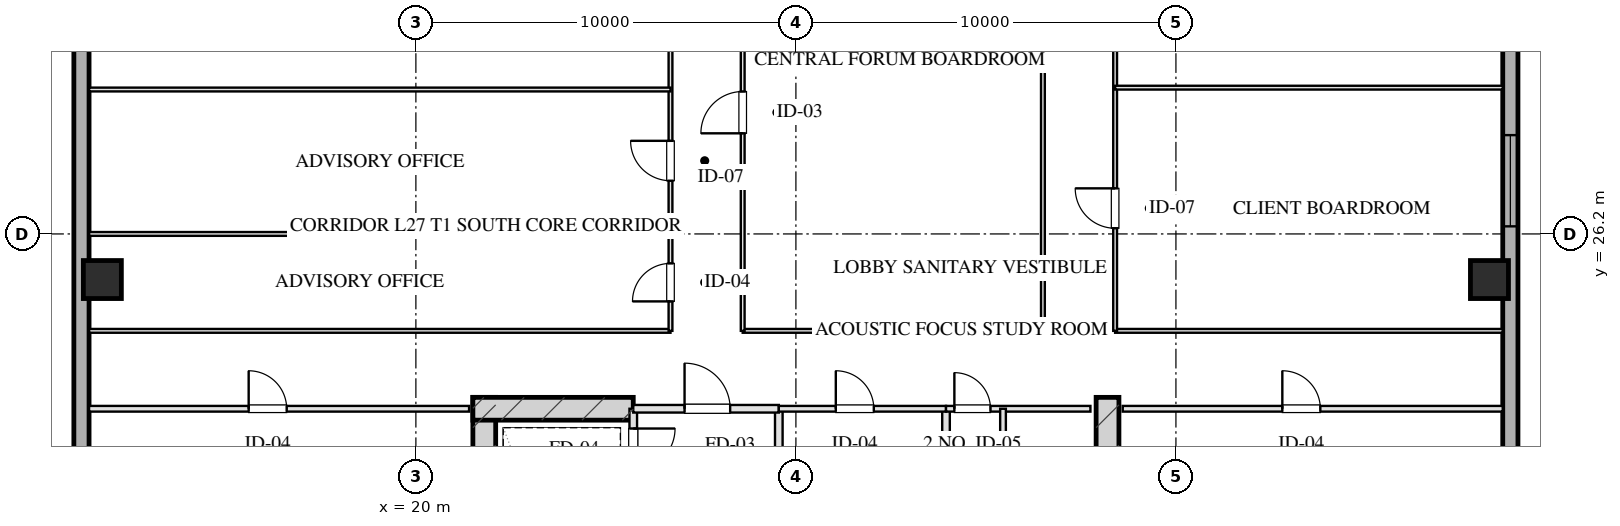
"""IFC4 building model, lengths in metres.
Left out: names, types, materials, properties, quantities, classifications, styles, units other than length and angle.
Written with IfcOpenShell. Run it as: python <this file> out.ifc"""

import sys

from ifc_helpers import new_model, si_unit, direction, frame, frame_2d, origin, origin_2d, place, context, subcontext, project, spatial, rectangle, hollow_rectangle, extrude, element, fill, save


model = new_model("IFC4")
c1 = context("Model", 3, precision=1e-05, world=origin(), true_north=direction((0.0, 1.0)))
c2 = subcontext(c1, "Body", "Model", "MODEL_VIEW")
j1 = project(units=[si_unit("LENGTHUNIT", "METRE"), si_unit("PLANEANGLEUNIT", "RADIAN")], contexts=[c1])
p1 = place(None, origin())
s1 = spatial("IfcSite", under=j1, at=p1, CompositionType="ELEMENT")
p2 = place(p1, origin())
s2 = spatial("IfcBuilding", under=s1, at=p2, CompositionType="ELEMENT")
p3 = place(p2, frame((0.0, 0.0, 106.95)))
s3 = spatial("IfcBuildingStorey", under=s2, at=p3, CompositionType="ELEMENT", Elevation=106.95)
for number, where, z_axis, x_axis in (
    (1, (21.8, 21.9, 0.0), (0.0, 0.0, 1.0), (0.0, -1.0, 0.0)),
    (2, (38.2, 21.9, 0.0), (0.0, 0.0, 1.0), (0.0, -1.0, 0.0)),
):
    element("IfcWall", number, at=place(p3, frame(where, z_axis=z_axis, x_axis=x_axis)), inside=s3, PredefinedType="SHEAR", context=c2, shape_type="SweptSolid", body=[
        extrude(rectangle(XDim=9.48, YDim=0.6, at=frame_2d((4.74, 0.0))), origin(), (0.0, 0.0, 1.0), 3.45),
    ])
p4 = place(p3, frame((21.5, 21.6, 0.0), z_axis=(0.0, 0.0, 1.0), x_axis=(1.0, 0.0, 0.0)))
e3 = element("IfcWall", 3, at=p4, inside=s3, PredefinedType="SHEAR", context=c2, shape_type="SweptSolid", body=[
    extrude(rectangle(XDim=4.22, YDim=0.6, at=frame_2d((2.11, 0.0))), origin(), (0.0, 0.0, 1.0), 3.45),
])
for number, where, z_axis, x_axis in (
    (4, (11.75, 25.0, 0.0), (0.0, 0.0, 1.0), (1.0, 0.0, 0.0)),
    (5, (48.25, 25.0, 0.0), (0.0, 0.0, 1.0), (1.0, 0.0, 0.0)),
):
    element("IfcColumn", number, at=place(p3, frame(where, z_axis=z_axis, x_axis=x_axis)), inside=s3, PredefinedType="COLUMN", context=c2, shape_type="SweptSolid", body=[
        extrude(hollow_rectangle(XDim=1.0, YDim=1.0, WallThickness=0.036, at=origin_2d()), origin(), (0.0, 0.0, 1.0), 3.451),
    ])
p5 = place(p3, frame((11.2, 9.0, 0.0), z_axis=(0.0, 0.0, 1.0), x_axis=(0.0, 1.0, 0.0)))
e6 = element("IfcWall", 6, at=p5, inside=s3, PredefinedType="SOLIDWALL", context=c2, shape_type="SweptSolid", body=[
    extrude(rectangle(XDim=50.0, YDim=0.4, at=frame_2d((25.0, 0.0))), origin(), (0.0, 0.0, 1.0), 2.61),
])
p6 = place(p5, frame((26.4, 0.0, 0.75)))
e7 = element("IfcOpeningElement", 7, at=p6, cuts=e6, PredefinedType="OPENING", context=c2, shape_type="SweptSolid", body=[
    extrude(rectangle(XDim=2.4, YDim=1.46, at=frame_2d((1.2, 0.73))), frame((0.0, 0.21, 0.0), z_axis=(0.0, -1.0, 0.0), x_axis=(1.0, 0.0, 0.0)), (0.0, 0.0, 1.0), 0.42),
])
p7 = place(p3, frame((48.8, 59.0, 0.0), z_axis=(0.0, 0.0, 1.0), x_axis=(0.0, -1.0, 0.0)))
e8 = element("IfcWall", 8, at=p7, inside=s3, PredefinedType="SOLIDWALL", context=c2, shape_type="SweptSolid", body=[
    extrude(rectangle(XDim=50.0, YDim=0.4, at=frame_2d((25.0, 0.0))), origin(), (0.0, 0.0, 1.0), 2.61),
])
p8 = place(p7, frame((30.2, 0.0, 0.75)))
e9 = element("IfcOpeningElement", 9, at=p8, cuts=e8, PredefinedType="OPENING", context=c2, shape_type="SweptSolid", body=[
    extrude(rectangle(XDim=2.4, YDim=1.46, at=frame_2d((1.2, 0.73))), frame((0.0, 0.21, 0.0), z_axis=(0.0, -1.0, 0.0), x_axis=(1.0, 0.0, 0.0)), (0.0, 0.0, 1.0), 0.42),
])
p9 = place(p7, frame((17.4, 0.0, 0.75)))
e10 = element("IfcOpeningElement", 10, at=p9, cuts=e8, PredefinedType="OPENING", context=c2, shape_type="SweptSolid", body=[
    extrude(rectangle(XDim=2.4, YDim=1.46, at=frame_2d((1.2, 0.73))), frame((0.0, 0.21, 0.0), z_axis=(0.0, -1.0, 0.0), x_axis=(1.0, 0.0, 0.0)), (0.0, 0.0, 1.0), 0.42),
])
p10 = place(p3, frame((25.72, 21.6, 0.0), z_axis=(0.0, 0.0, 1.0), x_axis=(0.0, -1.0, 0.0)))
e11 = element("IfcWall", 11, at=p10, inside=s3, PredefinedType="PARTITIONING", context=c2, shape_type="SweptSolid", body=[
    extrude(rectangle(XDim=1.9, YDim=0.2, at=frame_2d((0.95, 0.0))), origin(), (0.0, 0.0, 1.0), 3.175),
])
p11 = place(p10, frame((0.52, 0.0, 0.0)))
e12 = element("IfcOpeningElement", 12, at=p11, cuts=e11, PredefinedType="OPENING", context=c2, shape_type="SweptSolid", body=[
    extrude(rectangle(XDim=1.1, YDim=2.05, at=frame_2d((0.55, 1.025))), frame((0.0, 0.11, 0.0), z_axis=(0.0, -1.0, 0.0), x_axis=(1.0, 0.0, 0.0)), (0.0, 0.0, 1.0), 0.22),
])
p12 = place(p3, frame((29.55, 21.6, 0.0), z_axis=(0.0, 0.0, 1.0), x_axis=(0.0, -1.0, 0.0)))
e13 = element("IfcWall", 13, at=p12, inside=s3, PredefinedType="PARTITIONING", context=c2, shape_type="SweptSolid", body=[
    extrude(rectangle(XDim=8.43, YDim=0.2, at=frame_2d((4.215, 0.0))), origin(), (0.0, 0.0, 1.0), 3.175),
])
p13 = place(p3, frame((25.72, 21.6, 0.0), z_axis=(0.0, 0.0, 1.0), x_axis=(1.0, 0.0, 0.0)))
e14 = element("IfcWall", 14, at=p13, inside=s3, PredefinedType="PARTITIONING", context=c2, shape_type="SweptSolid", body=[
    extrude(rectangle(XDim=3.83, YDim=0.2, at=frame_2d((1.915, 0.0))), origin(), (0.0, 0.0, 1.0), 3.175),
])
p14 = place(p13, frame((1.35, 0.0, 0.0)))
e15 = element("IfcOpeningElement", 15, at=p14, cuts=e14, PredefinedType="OPENING", context=c2, shape_type="SweptSolid", body=[
    extrude(rectangle(XDim=1.2, YDim=2.05, at=frame_2d((0.6, 1.025))), frame((0.0, 0.11, 0.0), z_axis=(0.0, -1.0, 0.0), x_axis=(1.0, 0.0, 0.0)), (0.0, 0.0, 1.0), 0.22),
])
p15 = place(p3, frame((33.95, 21.6, 0.0), z_axis=(0.0, 0.0, 1.0), x_axis=(0.0, -1.0, 0.0)))
e16 = element("IfcWall", 16, at=p15, inside=s3, PredefinedType="PARTITIONING", context=c2, shape_type="SweptSolid", body=[
    extrude(rectangle(XDim=8.43, YDim=0.2, at=frame_2d((4.215, 0.0))), origin(), (0.0, 0.0, 1.0), 3.175),
])
p16 = place(p3, frame((29.55, 21.6, 0.0), z_axis=(0.0, 0.0, 1.0), x_axis=(1.0, 0.0, 0.0)))
e17 = element("IfcWall", 17, at=p16, inside=s3, PredefinedType="PARTITIONING", context=c2, shape_type="SweptSolid", body=[
    extrude(rectangle(XDim=4.4, YDim=0.15, at=frame_2d((2.2, 0.0))), origin(), (0.0, 0.0, 1.0), 3.175),
])
p17 = place(p16, frame((1.5, 0.0, 0.0)))
e18 = element("IfcOpeningElement", 18, at=p17, cuts=e17, PredefinedType="OPENING", context=c2, shape_type="SweptSolid", body=[
    extrude(rectangle(XDim=1.0, YDim=2.05, at=frame_2d((0.5, 1.025))), frame((0.0, 0.085, 0.0), z_axis=(0.0, -1.0, 0.0), x_axis=(1.0, 0.0, 0.0)), (0.0, 0.0, 1.0), 0.17),
])
p18 = place(p3, frame((33.95, 21.6, 0.0), z_axis=(0.0, 0.0, 1.0), x_axis=(1.0, 0.0, 0.0)))
e19 = element("IfcWall", 19, at=p18, inside=s3, PredefinedType="PARTITIONING", context=c2, shape_type="SweptSolid", body=[
    extrude(rectangle(XDim=3.8, YDim=0.15, at=frame_2d((1.9, 0.0))), origin(), (0.0, 0.0, 1.0), 3.175),
])
p19 = place(p18, frame((0.22, 0.0, 0.0)))
e20 = element("IfcOpeningElement", 20, at=p19, cuts=e19, PredefinedType="OPENING", context=c2, shape_type="SweptSolid", body=[
    extrude(rectangle(XDim=0.95, YDim=2.05, at=frame_2d((0.475, 1.025))), frame((0.0, 0.085, 0.0), z_axis=(0.0, -1.0, 0.0), x_axis=(1.0, 0.0, 0.0)), (0.0, 0.0, 1.0), 0.17),
])
p20 = place(p3, frame((35.45, 21.6, 0.0), z_axis=(0.0, 0.0, 1.0), x_axis=(0.0, -1.0, 0.0)))
e21 = element("IfcWall", 21, at=p20, inside=s3, PredefinedType="PARTITIONING", context=c2, shape_type="SweptSolid", body=[
    extrude(rectangle(XDim=8.43, YDim=0.15, at=frame_2d((4.215, 0.0))), origin(), (0.0, 0.0, 1.0), 2.815),
])
p21 = place(p20, frame((2.55, 0.0, 0.0)))
e22 = element("IfcOpeningElement", 22, at=p21, cuts=e21, PredefinedType="OPENING", context=c2, shape_type="SweptSolid", body=[
    extrude(rectangle(XDim=0.95, YDim=2.05, at=frame_2d((0.475, 1.025))), frame((0.0, 0.085, 0.0), z_axis=(0.0, -1.0, 0.0), x_axis=(1.0, 0.0, 0.0)), (0.0, 0.0, 1.0), 0.17),
])
p22 = place(p20, frame((4.7, 0.0, 0.0)))
e23 = element("IfcOpeningElement", 23, at=p22, cuts=e21, PredefinedType="OPENING", context=c2, shape_type="SweptSolid", body=[
    extrude(rectangle(XDim=0.9, YDim=2.05, at=frame_2d((0.45, 1.025))), frame((0.0, 0.085, 0.0), z_axis=(0.0, -1.0, 0.0), x_axis=(1.0, 0.0, 0.0)), (0.0, 0.0, 1.0), 0.17),
])
p23 = place(p20, frame((6.8, 0.0, 0.0)))
e24 = element("IfcOpeningElement", 24, at=p23, cuts=e21, PredefinedType="OPENING", context=c2, shape_type="SweptSolid", body=[
    extrude(rectangle(XDim=0.9, YDim=2.05, at=frame_2d((0.45, 1.025))), frame((0.0, 0.085, 0.0), z_axis=(0.0, -1.0, 0.0), x_axis=(1.0, 0.0, 0.0)), (0.0, 0.0, 1.0), 0.17),
])
p24 = place(p3, frame((11.4, 21.6, 0.0), z_axis=(0.0, 0.0, 1.0), x_axis=(1.0, 0.0, 0.0)))
e25 = element("IfcWall", 25, at=p24, inside=s3, PredefinedType="PARTITIONING", context=c2, shape_type="SweptSolid", body=[
    extrude(rectangle(XDim=10.0, YDim=0.15, at=frame_2d((5.0, 0.0))), origin(), (0.0, 0.0, 1.0), 3.175),
])
p25 = place(p24, frame((4.2, 0.0, 0.0)))
e26 = element("IfcOpeningElement", 26, at=p25, cuts=e25, PredefinedType="OPENING", context=c2, shape_type="SweptSolid", body=[
    extrude(rectangle(XDim=1.0, YDim=2.05, at=frame_2d((0.5, 1.025))), frame((0.0, 0.085, 0.0), z_axis=(0.0, -1.0, 0.0), x_axis=(1.0, 0.0, 0.0)), (0.0, 0.0, 1.0), 0.17),
])
p26 = place(p3, frame((38.6, 21.6, 0.0), z_axis=(0.0, 0.0, 1.0), x_axis=(1.0, 0.0, 0.0)))
e27 = element("IfcWall", 27, at=p26, inside=s3, PredefinedType="PARTITIONING", context=c2, shape_type="SweptSolid", body=[
    extrude(rectangle(XDim=10.0, YDim=0.15, at=frame_2d((5.0, 0.0))), origin(), (0.0, 0.0, 1.0), 3.175),
])
p27 = place(p26, frame((4.2, 0.0, 0.0)))
e28 = element("IfcOpeningElement", 28, at=p27, cuts=e27, PredefinedType="OPENING", context=c2, shape_type="SweptSolid", body=[
    extrude(rectangle(XDim=1.0, YDim=2.05, at=frame_2d((0.5, 1.025))), frame((0.0, 0.085, 0.0), z_axis=(0.0, -1.0, 0.0), x_axis=(1.0, 0.0, 0.0)), (0.0, 0.0, 1.0), 0.17),
])
p28 = place(p3, frame((11.4, 23.65, 0.0), z_axis=(0.0, 0.0, 1.0), x_axis=(1.0, 0.0, 0.0)))
e29 = element("IfcWall", 29, at=p28, inside=s3, PredefinedType="MOVABLE", context=c2, shape_type="SweptSolid", body=[
    extrude(rectangle(XDim=15.3, YDim=0.1, at=frame_2d((7.65, 0.0))), origin(), (0.0, 0.0, 1.0), 3.175),
])
p29 = place(p3, frame((28.6, 23.65, 0.0), z_axis=(0.0, 0.0, 1.0), x_axis=(1.0, 0.0, 0.0)))
e30 = element("IfcWall", 30, at=p29, inside=s3, PredefinedType="MOVABLE", context=c2, shape_type="SweptSolid", body=[
    extrude(rectangle(XDim=7.9, YDim=0.1, at=frame_2d((3.95, 0.0))), origin(), (0.0, 0.0, 1.0), 3.175),
])
p30 = place(p3, frame((38.4, 23.65, 0.0), z_axis=(0.0, 0.0, 1.0), x_axis=(1.0, 0.0, 0.0)))
e31 = element("IfcWall", 31, at=p30, inside=s3, PredefinedType="MOVABLE", context=c2, shape_type="SweptSolid", body=[
    extrude(rectangle(XDim=10.2, YDim=0.1, at=frame_2d((5.1, 0.0))), origin(), (0.0, 0.0, 1.0), 3.175),
])
p31 = place(p3, frame((26.7, 23.65, 0.0), z_axis=(0.0, 0.0, 1.0), x_axis=(0.0, 1.0, 0.0)))
e32 = element("IfcWall", 32, at=p31, inside=s3, PredefinedType="MOVABLE", context=c2, shape_type="SweptSolid", body=[
    extrude(rectangle(XDim=20.7, YDim=0.1, at=frame_2d((10.35, 0.0))), origin(), (0.0, 0.0, 1.0), 3.175),
])
p32 = place(p31, frame((0.775, 0.0, 0.0)))
e33 = element("IfcOpeningElement", 33, at=p32, cuts=e32, PredefinedType="OPENING", context=c2, shape_type="SweptSolid", body=[
    extrude(rectangle(XDim=1.0, YDim=2.05, at=frame_2d((0.5, 1.025))), frame((0.0, 0.06, 0.0), z_axis=(0.0, -1.0, 0.0), x_axis=(1.0, 0.0, 0.0)), (0.0, 0.0, 1.0), 0.12),
])
p33 = place(p31, frame((3.95, 0.0, 0.0)))
e34 = element("IfcOpeningElement", 34, at=p33, cuts=e32, PredefinedType="OPENING", context=c2, shape_type="SweptSolid", body=[
    extrude(rectangle(XDim=1.05, YDim=2.05, at=frame_2d((0.525, 1.025))), frame((0.0, 0.06, 0.0), z_axis=(0.0, -1.0, 0.0), x_axis=(1.0, 0.0, 0.0)), (0.0, 0.0, 1.0), 0.12),
])
p34 = place(p31, frame((8.273, 0.0, 0.0)))
e35 = element("IfcOpeningElement", 35, at=p34, cuts=e32, PredefinedType="OPENING", context=c2, shape_type="SweptSolid", body=[
    extrude(rectangle(XDim=1.0, YDim=2.05, at=frame_2d((0.5, 1.025))), frame((0.0, 0.06, 0.0), z_axis=(0.0, -1.0, 0.0), x_axis=(1.0, 0.0, 0.0)), (0.0, 0.0, 1.0), 0.12),
])
p35 = place(p31, frame((12.559, 0.0, 0.0)))
e36 = element("IfcOpeningElement", 36, at=p35, cuts=e32, PredefinedType="OPENING", context=c2, shape_type="SweptSolid", body=[
    extrude(rectangle(XDim=1.0, YDim=2.05, at=frame_2d((0.5, 1.025))), frame((0.0, 0.06, 0.0), z_axis=(0.0, -1.0, 0.0), x_axis=(1.0, 0.0, 0.0)), (0.0, 0.0, 1.0), 0.12),
])
p36 = place(p31, frame((16.078, 0.0, 0.0)))
e37 = element("IfcOpeningElement", 37, at=p36, cuts=e32, PredefinedType="OPENING", context=c2, shape_type="SweptSolid", body=[
    extrude(rectangle(XDim=1.0, YDim=2.05, at=frame_2d((0.5, 1.025))), frame((0.0, 0.06, 0.0), z_axis=(0.0, -1.0, 0.0), x_axis=(1.0, 0.0, 0.0)), (0.0, 0.0, 1.0), 0.12),
])
p37 = place(p31, frame((18.967, 0.0, 0.0)))
e38 = element("IfcOpeningElement", 38, at=p37, cuts=e32, PredefinedType="OPENING", context=c2, shape_type="SweptSolid", body=[
    extrude(rectangle(XDim=1.0, YDim=2.05, at=frame_2d((0.5, 1.025))), frame((0.0, 0.06, 0.0), z_axis=(0.0, -1.0, 0.0), x_axis=(1.0, 0.0, 0.0)), (0.0, 0.0, 1.0), 0.12),
])
p38 = place(p3, frame((28.6, 23.65, 0.0), z_axis=(0.0, 0.0, 1.0), x_axis=(0.0, 1.0, 0.0)))
e39 = element("IfcWall", 39, at=p38, inside=s3, PredefinedType="MOVABLE", context=c2, shape_type="SweptSolid", body=[
    extrude(rectangle(XDim=20.7, YDim=0.1, at=frame_2d((10.35, 0.0))), origin(), (0.0, 0.0, 1.0), 3.175),
])
p39 = place(p38, frame((5.198, 0.0, 0.0)))
e40 = element("IfcOpeningElement", 40, at=p39, cuts=e39, PredefinedType="OPENING", context=c2, shape_type="SweptSolid", body=[
    extrude(rectangle(XDim=1.1, YDim=2.05, at=frame_2d((0.55, 1.025))), frame((0.0, 0.06, 0.0), z_axis=(0.0, -1.0, 0.0), x_axis=(1.0, 0.0, 0.0)), (0.0, 0.0, 1.0), 0.12),
])
p40 = place(p38, frame((15.667, 0.0, 0.0)))
e41 = element("IfcOpeningElement", 41, at=p40, cuts=e39, PredefinedType="OPENING", context=c2, shape_type="SweptSolid", body=[
    extrude(rectangle(XDim=1.1, YDim=2.05, at=frame_2d((0.55, 1.025))), frame((0.0, 0.06, 0.0), z_axis=(0.0, -1.0, 0.0), x_axis=(1.0, 0.0, 0.0)), (0.0, 0.0, 1.0), 0.12),
])
p41 = place(p3, frame((36.5, 23.65, 0.0), z_axis=(0.0, 0.0, 1.0), x_axis=(0.0, 1.0, 0.0)))
e42 = element("IfcWall", 42, at=p41, inside=s3, PredefinedType="MOVABLE", context=c2, shape_type="SweptSolid", body=[
    extrude(rectangle(XDim=20.7, YDim=0.1, at=frame_2d((10.35, 0.0))), origin(), (0.0, 0.0, 1.0), 3.175),
])
p42 = place(p3, frame((38.4, 23.65, 0.0), z_axis=(0.0, 0.0, 1.0), x_axis=(0.0, 1.0, 0.0)))
e43 = element("IfcWall", 43, at=p42, inside=s3, PredefinedType="MOVABLE", context=c2, shape_type="SweptSolid", body=[
    extrude(rectangle(XDim=20.7, YDim=0.1, at=frame_2d((10.35, 0.0))), origin(), (0.0, 0.0, 1.0), 3.175),
])
p43 = place(p42, frame((2.699, 0.0, 0.0)))
e44 = element("IfcOpeningElement", 44, at=p43, cuts=e43, PredefinedType="OPENING", context=c2, shape_type="SweptSolid", body=[
    extrude(rectangle(XDim=1.05, YDim=2.05, at=frame_2d((0.525, 1.025))), frame((0.0, 0.06, 0.0), z_axis=(0.0, -1.0, 0.0), x_axis=(1.0, 0.0, 0.0)), (0.0, 0.0, 1.0), 0.12),
])
p44 = place(p42, frame((9.875, 0.0, 0.0)))
e45 = element("IfcOpeningElement", 45, at=p44, cuts=e43, PredefinedType="OPENING", context=c2, shape_type="SweptSolid", body=[
    extrude(rectangle(XDim=1.0, YDim=2.05, at=frame_2d((0.5, 1.025))), frame((0.0, 0.06, 0.0), z_axis=(0.0, -1.0, 0.0), x_axis=(1.0, 0.0, 0.0)), (0.0, 0.0, 1.0), 0.12),
])
p45 = place(p42, frame((17.025, 0.0, 0.0)))
e46 = element("IfcOpeningElement", 46, at=p45, cuts=e43, PredefinedType="OPENING", context=c2, shape_type="SweptSolid", body=[
    extrude(rectangle(XDim=0.85, YDim=2.05, at=frame_2d((0.425, 1.025))), frame((0.0, 0.06, 0.0), z_axis=(0.0, -1.0, 0.0), x_axis=(1.0, 0.0, 0.0)), (0.0, 0.0, 1.0), 0.12),
])
for number, where, z_axis, x_axis in (
    (47, (11.4, 26.2, 0.0), (0.0, 0.0, 1.0), (1.0, 0.0, 0.0)),
    (48, (11.4, 30.0, 0.0), (0.0, 0.0, 1.0), (1.0, 0.0, 0.0)),
):
    element("IfcWall", number, at=place(p3, frame(where, z_axis=z_axis, x_axis=x_axis)), inside=s3, PredefinedType="MOVABLE", context=c2, shape_type="SweptSolid", body=[
        extrude(rectangle(XDim=15.3, YDim=0.1, at=frame_2d((7.65, 0.0))), origin(), (0.0, 0.0, 1.0), 3.175),
    ])
p46 = place(p3, frame((38.4, 30.049, 0.0), z_axis=(0.0, 0.0, 1.0), x_axis=(1.0, 0.0, 0.0)))
e49 = element("IfcWall", 49, at=p46, inside=s3, PredefinedType="MOVABLE", context=c2, shape_type="SweptSolid", body=[
    extrude(rectangle(XDim=10.2, YDim=0.1, at=frame_2d((5.1, 0.0))), origin(), (0.0, 0.0, 1.0), 3.175),
])
p47 = place(p8, origin())
e50 = element("IfcWindow", 50, at=p47, inside=s3, PartitioningType="TRIPLE_PANEL_VERTICAL", PredefinedType="WINDOW", context=c2, shape_type="SweptSolid", body=[
    extrude(rectangle(XDim=2.4, YDim=1.46, at=frame_2d((1.2, 0.73))), frame((0.0, 0.03, 0.0), z_axis=(0.0, -1.0, 0.0), x_axis=(1.0, 0.0, 0.0)), (0.0, 0.0, 1.0), 0.06),
])
fill(e9, e50)
p48 = place(p11, origin())
e51 = element("IfcDoor", 51, at=p48, inside=s3, OperationType="SINGLE_SWING_LEFT", PredefinedType="DOOR", context=c2, shape_type="SweptSolid", body=[
    extrude(rectangle(XDim=1.1, YDim=2.05, at=frame_2d((0.55, 1.025))), frame((0.0, 0.025, 0.0), z_axis=(0.0, -1.0, 0.0), x_axis=(1.0, 0.0, 0.0)), (0.0, 0.0, 1.0), 0.05),
])
fill(e12, e51)
p49 = place(p14, origin())
e52 = element("IfcDoor", 52, at=p49, inside=s3, OperationType="SINGLE_SWING_LEFT", PredefinedType="DOOR", context=c2, shape_type="SweptSolid", body=[
    extrude(rectangle(XDim=1.2, YDim=2.05, at=frame_2d((0.6, 1.025))), frame((0.0, 0.025, 0.0), z_axis=(0.0, -1.0, 0.0), x_axis=(1.0, 0.0, 0.0)), (0.0, 0.0, 1.0), 0.05),
])
fill(e15, e52)
p50 = place(p17, origin())
e53 = element("IfcDoor", 53, at=p50, inside=s3, OperationType="SINGLE_SWING_LEFT", PredefinedType="DOOR", context=c2, shape_type="SweptSolid", body=[
    extrude(rectangle(XDim=1.0, YDim=2.05, at=frame_2d((0.5, 1.025))), frame((0.0, 0.025, 0.0), z_axis=(0.0, -1.0, 0.0), x_axis=(1.0, 0.0, 0.0)), (0.0, 0.0, 1.0), 0.05),
])
fill(e18, e53)
p51 = place(p19, origin())
e54 = element("IfcDoor", 54, at=p51, inside=s3, OperationType="SINGLE_SWING_LEFT", PredefinedType="DOOR", context=c2, shape_type="SweptSolid", body=[
    extrude(rectangle(XDim=0.95, YDim=2.05, at=frame_2d((0.475, 1.025))), frame((0.0, 0.025, 0.0), z_axis=(0.0, -1.0, 0.0), x_axis=(1.0, 0.0, 0.0)), (0.0, 0.0, 1.0), 0.05),
])
fill(e20, e54)
p52 = place(p25, origin())
e55 = element("IfcDoor", 55, at=p52, inside=s3, OperationType="SINGLE_SWING_LEFT", PredefinedType="DOOR", context=c2, shape_type="SweptSolid", body=[
    extrude(rectangle(XDim=1.0, YDim=2.05, at=frame_2d((0.5, 1.025))), frame((0.0, 0.025, 0.0), z_axis=(0.0, -1.0, 0.0), x_axis=(1.0, 0.0, 0.0)), (0.0, 0.0, 1.0), 0.05),
])
fill(e26, e55)
p53 = place(p27, origin())
e56 = element("IfcDoor", 56, at=p53, inside=s3, OperationType="SINGLE_SWING_LEFT", PredefinedType="DOOR", context=c2, shape_type="SweptSolid", body=[
    extrude(rectangle(XDim=1.0, YDim=2.05, at=frame_2d((0.5, 1.025))), frame((0.0, 0.025, 0.0), z_axis=(0.0, -1.0, 0.0), x_axis=(1.0, 0.0, 0.0)), (0.0, 0.0, 1.0), 0.05),
])
fill(e28, e56)
p54 = place(p32, origin())
e57 = element("IfcDoor", 57, at=p54, inside=s3, OperationType="SINGLE_SWING_LEFT", PredefinedType="DOOR", context=c2, shape_type="SweptSolid", body=[
    extrude(rectangle(XDim=1.0, YDim=2.05, at=frame_2d((0.5, 1.025))), frame((0.0, 0.025, 0.0), z_axis=(0.0, -1.0, 0.0), x_axis=(1.0, 0.0, 0.0)), (0.0, 0.0, 1.0), 0.05),
])
fill(e33, e57)
p55 = place(p33, origin())
e58 = element("IfcDoor", 58, at=p55, inside=s3, OperationType="SINGLE_SWING_RIGHT", PredefinedType="DOOR", context=c2, shape_type="SweptSolid", body=[
    extrude(rectangle(XDim=1.05, YDim=2.05, at=frame_2d((0.525, 1.025))), frame((0.0, 0.025, 0.0), z_axis=(0.0, -1.0, 0.0), x_axis=(1.0, 0.0, 0.0)), (0.0, 0.0, 1.0), 0.05),
])
fill(e34, e58)
p56 = place(p39, origin())
e59 = element("IfcDoor", 59, at=p56, inside=s3, OperationType="SINGLE_SWING_LEFT", PredefinedType="DOOR", context=c2, shape_type="SweptSolid", body=[
    extrude(rectangle(XDim=1.1, YDim=2.05, at=frame_2d((0.55, 1.025))), frame((0.0, 0.025, 0.0), z_axis=(0.0, -1.0, 0.0), x_axis=(1.0, 0.0, 0.0)), (0.0, 0.0, 1.0), 0.05),
])
fill(e40, e59)
p57 = place(p43, origin())
e60 = element("IfcDoor", 60, at=p57, inside=s3, OperationType="SINGLE_SWING_RIGHT", PredefinedType="DOOR", context=c2, shape_type="SweptSolid", body=[
    extrude(rectangle(XDim=1.05, YDim=2.05, at=frame_2d((0.525, 1.025))), frame((0.0, 0.025, 0.0), z_axis=(0.0, -1.0, 0.0), x_axis=(1.0, 0.0, 0.0)), (0.0, 0.0, 1.0), 0.05),
])
fill(e44, e60)
save(model, sys.argv[1])
